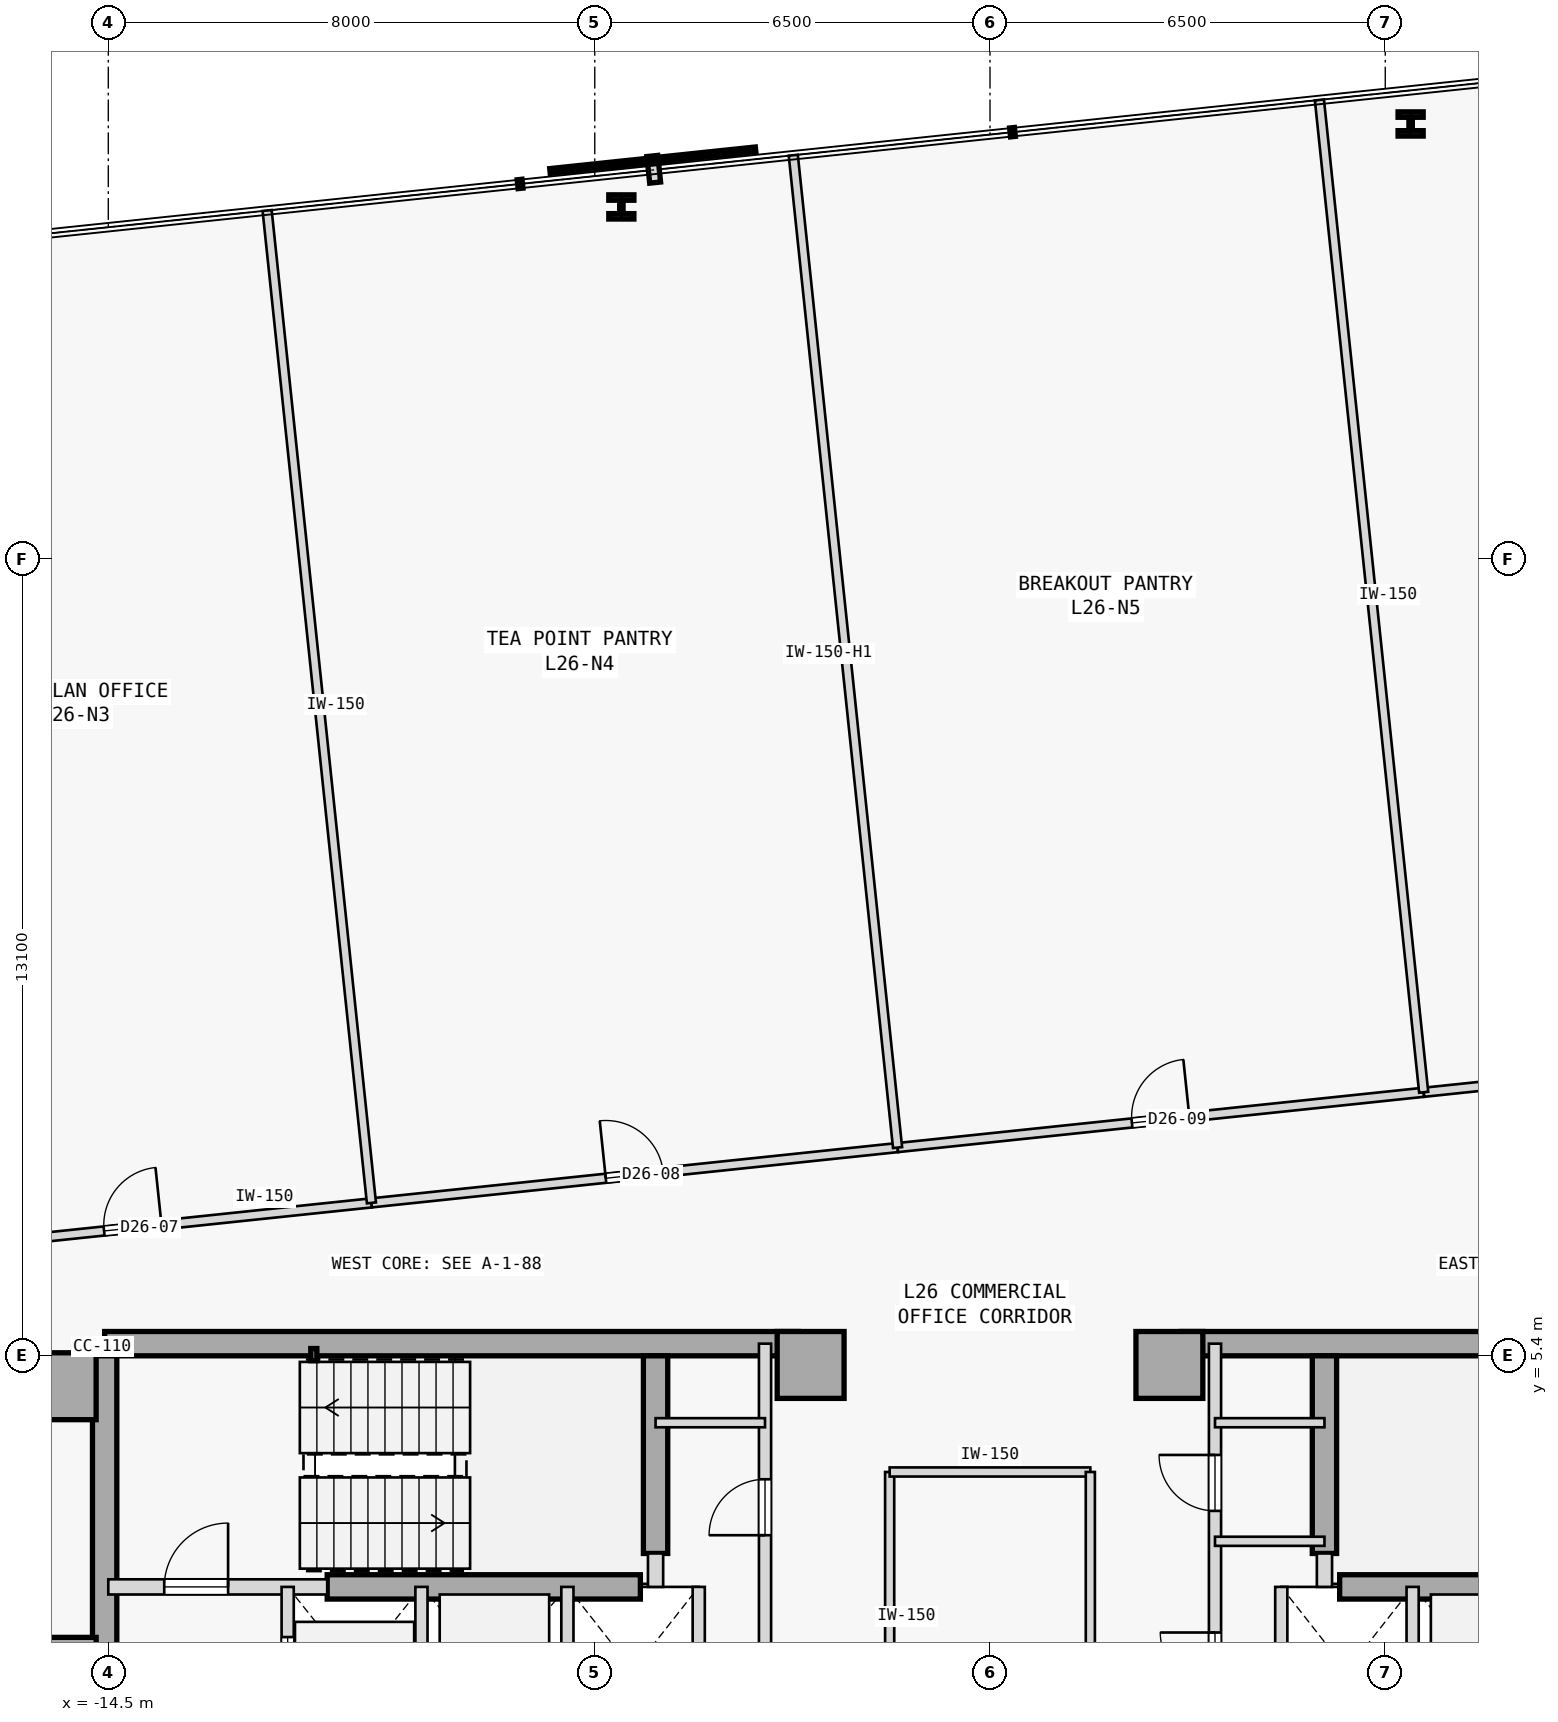
"""IFC4 building model, lengths in metres.
Left out: names, types, materials, properties, quantities, classifications, styles, units other than length and angle.
Written with IfcOpenShell. Run it as: python <this file> out.ifc"""

import sys

from ifc_helpers import new_model, si_unit, direction, frame, frame_2d, origin, origin_2d, place, context, subcontext, project, spatial, rectangle, hollow_rectangle, i_section, extrude, element, fill, save


model = new_model("IFC4")
c1 = context("Model", 3, precision=1e-05, world=origin(), true_north=direction((0.0, 1.0)))
c2 = subcontext(c1, "Body", "Model", "MODEL_VIEW")
j1 = project(units=[si_unit("LENGTHUNIT", "METRE"), si_unit("PLANEANGLEUNIT", "RADIAN")], contexts=[c1])
p1 = place(None, origin())
s1 = spatial("IfcSite", under=j1, at=p1, CompositionType="ELEMENT")
p2 = place(p1, origin())
s2 = spatial("IfcBuilding", under=s1, at=p2, CompositionType="ELEMENT")
p3 = place(p2, frame((0.0, 0.0, 105.9)))
s3 = spatial("IfcBuildingStorey", under=s2, at=p3, CompositionType="ELEMENT", Elevation=105.9)
for number, where, z_axis, x_axis in (
    (1, (-15.25, 4.9, 0.0), (0.0, 0.0, 1.0), (1.0, 0.0, 0.0)),
    (2, (-15.25, 0.22, 0.0), (0.0, 0.0, 1.0), (1.0, 0.0, 0.0)),
    (3, (-2.95, 5.25, 0.0), (0.0, 0.0, 1.0), (1.0, 0.0, 0.0)),
    (4, (2.95, 5.25, 0.0), (0.0, 0.0, 1.0), (1.0, 0.0, 0.0)),
):
    element("IfcColumn", number, at=place(p3, frame(where, z_axis=z_axis, x_axis=x_axis)), inside=s3, PredefinedType="COLUMN", context=c2, shape_type="SweptSolid", body=[
        extrude(rectangle(XDim=1.1, YDim=1.1, at=origin_2d()), origin(), (0.0, 0.0, 1.0), 3.7),
    ])
p4 = place(p3, frame((-14.56, 5.6, 0.0), z_axis=(0.0, 0.0, 1.0), x_axis=(1.0, 0.0, 0.0)))
e5 = element("IfcWall", 5, at=p4, inside=s3, PredefinedType="SHEAR", context=c2, shape_type="SweptSolid", body=[
    extrude(rectangle(XDim=11.41, YDim=0.4, at=frame_2d((5.705, 0.0))), origin(), (0.0, 0.0, 1.0), 3.475),
])
p5 = place(p3, frame((-14.56, -5.4, 0.0), z_axis=(0.0, 0.0, 1.0), x_axis=(0.0, 1.0, 0.0)))
e6 = element("IfcWall", 6, at=p5, inside=s3, PredefinedType="SHEAR", context=c2, shape_type="SweptSolid", body=[
    extrude(rectangle(XDim=10.8, YDim=0.4, at=frame_2d((5.4, 0.0))), origin(), (0.0, 0.0, 1.0), 3.475),
])
p6 = place(p3, frame((-5.5, 2.15, 0.0), z_axis=(0.0, 0.0, 1.0), x_axis=(0.0, 1.0, 0.0)))
e7 = element("IfcWall", 7, at=p6, inside=s3, PredefinedType="SHEAR", context=c2, shape_type="SweptSolid", body=[
    extrude(rectangle(XDim=3.25, YDim=0.4, at=frame_2d((1.625, 0.0))), origin(), (0.0, 0.0, 1.0), 3.475),
])
p7 = place(p3, frame((-10.9, 1.6, 0.0), z_axis=(0.0, 0.0, 1.0), x_axis=(1.0, 0.0, 0.0)))
e8 = element("IfcWall", 8, at=p7, inside=s3, PredefinedType="SHEAR", context=c2, shape_type="SweptSolid", body=[
    extrude(rectangle(XDim=5.15, YDim=0.4, at=frame_2d((2.575, 0.0))), origin(), (0.0, 0.0, 1.0), 3.475),
])
p8 = place(p3, frame((3.15, 5.6, 0.0), z_axis=(0.0, 0.0, 1.0), x_axis=(1.0, 0.0, 0.0)))
e9 = element("IfcWall", 9, at=p8, inside=s3, PredefinedType="SHEAR", context=c2, shape_type="SweptSolid", body=[
    extrude(rectangle(XDim=11.41, YDim=0.4, at=frame_2d((5.705, 0.0))), origin(), (0.0, 0.0, 1.0), 3.475),
])
p9 = place(p3, frame((5.5, 2.15, 0.0), z_axis=(0.0, 0.0, 1.0), x_axis=(0.0, 1.0, 0.0)))
e10 = element("IfcWall", 10, at=p9, inside=s3, PredefinedType="SHEAR", context=c2, shape_type="SweptSolid", body=[
    extrude(rectangle(XDim=3.25, YDim=0.4, at=frame_2d((1.625, 0.0))), origin(), (0.0, 0.0, 1.0), 3.475),
])
p10 = place(p3, frame((5.75, 1.6, 0.0), z_axis=(0.0, 0.0, 1.0), x_axis=(1.0, 0.0, 0.0)))
e11 = element("IfcWall", 11, at=p10, inside=s3, PredefinedType="SHEAR", context=c2, shape_type="SweptSolid", body=[
    extrude(rectangle(XDim=5.15, YDim=0.4, at=frame_2d((2.575, 0.0))), origin(), (0.0, 0.0, 1.0), 3.475),
])
p11 = place(p3, frame((-11.12, 5.42, 0.0), z_axis=(0.0, 0.0, 1.0), x_axis=(1.0, 0.0, 0.0)))
e12 = element("IfcColumn", 12, at=p11, inside=s3, PredefinedType="COLUMN", context=c2, shape_type="SweptSolid", body=[
    extrude(hollow_rectangle(XDim=0.1, YDim=0.2, WallThickness=0.008, at=origin_2d()), origin(), (0.0, 0.0, 1.0), 3.7),
])
for number, where, z_axis, x_axis in (
    (13, (6.917, 25.658, 0.0), (0.0, 0.0, 1.0), (1.0, 0.0, 0.0)),
    (14, (-6.062, 24.293, 0.0), (0.0, 0.0, 1.0), (1.0, 0.0, 0.0)),
):
    element("IfcColumn", number, at=place(p3, frame(where, z_axis=z_axis, x_axis=x_axis)), inside=s3, PredefinedType="COLUMN", context=c2, shape_type="SweptSolid", body=[
        extrude(i_section(OverallWidth=0.413, OverallDepth=0.398, WebThickness=0.056, FlangeThickness=0.089, FilletRadius=0.015, at=origin_2d()), origin(), (0.0, 0.0, 1.0), 3.7),
    ])
p12 = place(p3, frame((-14.5, 1.6, 0.0), z_axis=(0.0, 0.0, 1.0), x_axis=(1.0, 0.0, 0.0)))
e15 = element("IfcWall", 15, at=p12, inside=s3, PredefinedType="STANDARD", context=c2, shape_type="SweptSolid", body=[
    extrude(rectangle(XDim=3.6, YDim=0.25, at=frame_2d((1.8, 0.0))), origin(), (0.0, 0.0, 1.0), 3.475),
])
p13 = place(p12, frame((0.92, 0.0, 0.0)))
e16 = element("IfcOpeningElement", 16, at=p13, cuts=e15, PredefinedType="OPENING", context=c2, shape_type="SweptSolid", body=[
    extrude(rectangle(XDim=1.05, YDim=2.15, at=frame_2d((0.525, 1.075))), frame((0.0, 0.135, 0.0), z_axis=(0.0, -1.0, 0.0), x_axis=(1.0, 0.0, 0.0)), (0.0, 0.0, 1.0), 0.27),
])
p14 = place(p3, frame((-5.5, 1.6, 0.0), z_axis=(0.0, 0.0, 1.0), x_axis=(0.0, 1.0, 0.0)))
e17 = element("IfcWall", 17, at=p14, inside=s3, PredefinedType="STANDARD", context=c2, shape_type="SweptSolid", body=[
    extrude(rectangle(XDim=0.55, YDim=0.25, at=frame_2d((0.275, 0.0))), origin(), (0.0, 0.0, 1.0), 3.475),
])
p15 = place(p3, frame((-3.7, -1.15, 0.0), z_axis=(0.0, 0.0, 1.0), x_axis=(0.0, 1.0, 0.0)))
e18 = element("IfcWall", 18, at=p15, inside=s3, PredefinedType="STANDARD", context=c2, shape_type="SweptSolid", body=[
    extrude(rectangle(XDim=6.75, YDim=0.2, at=frame_2d((3.375, 0.0))), origin(), (0.0, 0.0, 1.0), 3.475),
])
p16 = place(p15, frame((3.6, 0.0, 0.0)))
e19 = element("IfcOpeningElement", 19, at=p16, cuts=e18, PredefinedType="OPENING", context=c2, shape_type="SweptSolid", body=[
    extrude(rectangle(XDim=0.92, YDim=2.15, at=frame_2d((0.46, 1.075))), frame((0.0, 0.11, 0.0), z_axis=(0.0, -1.0, 0.0), x_axis=(1.0, 0.0, 0.0)), (0.0, 0.0, 1.0), 0.22),
])
p17 = place(p3, frame((-11.55, -1.15, 0.0), z_axis=(0.0, 0.0, 1.0), x_axis=(0.0, 1.0, 0.0)))
e20 = element("IfcWall", 20, at=p17, inside=s3, PredefinedType="STANDARD", context=c2, shape_type="SweptSolid", body=[
    extrude(rectangle(XDim=2.75, YDim=0.2, at=frame_2d((1.375, 0.0))), origin(), (0.0, 0.0, 1.0), 3.475),
])
p18 = place(p17, frame((0.825, 0.0, 0.0)))
e21 = element("IfcOpeningElement", 21, at=p18, cuts=e20, PredefinedType="OPENING", context=c2, shape_type="SweptSolid", body=[
    extrude(rectangle(XDim=1.1, YDim=2.15, at=frame_2d((0.55, 1.075))), frame((0.0, 0.11, 0.0), z_axis=(0.0, -1.0, 0.0), x_axis=(1.0, 0.0, 0.0)), (0.0, 0.0, 1.0), 0.22),
])
for number, where, z_axis, x_axis in (
    (22, (-9.35, -1.15, 0.0), (0.0, 0.0, 1.0), (0.0, 1.0, 0.0)),
    (23, (-6.95, -1.15, 0.0), (0.0, 0.0, 1.0), (0.0, 1.0, 0.0)),
    (24, (-4.79, -1.15, 0.0), (0.0, 0.0, 1.0), (0.0, 1.0, 0.0)),
):
    element("IfcWall", number, at=place(p3, frame(where, z_axis=z_axis, x_axis=x_axis)), inside=s3, PredefinedType="STANDARD", context=c2, shape_type="SweptSolid", body=[
        extrude(rectangle(XDim=2.75, YDim=0.2, at=frame_2d((1.375, 0.0))), origin(), (0.0, 0.0, 1.0), 3.475),
    ])
p19 = place(p3, frame((5.5, 1.6, 0.0), z_axis=(0.0, 0.0, 1.0), x_axis=(0.0, 1.0, 0.0)))
e25 = element("IfcWall", 25, at=p19, inside=s3, PredefinedType="STANDARD", context=c2, shape_type="SweptSolid", body=[
    extrude(rectangle(XDim=0.55, YDim=0.25, at=frame_2d((0.275, 0.0))), origin(), (0.0, 0.0, 1.0), 3.475),
])
p20 = place(p3, frame((3.7, -1.15, 0.0), z_axis=(0.0, 0.0, 1.0), x_axis=(0.0, 1.0, 0.0)))
e26 = element("IfcWall", 26, at=p20, inside=s3, PredefinedType="STANDARD", context=c2, shape_type="SweptSolid", body=[
    extrude(rectangle(XDim=6.75, YDim=0.2, at=frame_2d((3.375, 0.0))), origin(), (0.0, 0.0, 1.0), 3.475),
])
p21 = place(p20, frame((1.1, 0.0, 0.0)))
e27 = element("IfcOpeningElement", 27, at=p21, cuts=e26, PredefinedType="OPENING", context=c2, shape_type="SweptSolid", body=[
    extrude(rectangle(XDim=0.9, YDim=2.15, at=frame_2d((0.45, 1.075))), frame((0.0, 0.11, 0.0), z_axis=(0.0, -1.0, 0.0), x_axis=(1.0, 0.0, 0.0)), (0.0, 0.0, 1.0), 0.22),
])
p22 = place(p20, frame((4.0, 0.0, 0.0)))
e28 = element("IfcOpeningElement", 28, at=p22, cuts=e26, PredefinedType="OPENING", context=c2, shape_type="SweptSolid", body=[
    extrude(rectangle(XDim=0.92, YDim=2.15, at=frame_2d((0.46, 1.075))), frame((0.0, 0.11, 0.0), z_axis=(0.0, -1.0, 0.0), x_axis=(1.0, 0.0, 0.0)), (0.0, 0.0, 1.0), 0.22),
])
for number, where, z_axis, x_axis in (
    (29, (6.95, -1.15, 0.0), (0.0, 0.0, 1.0), (0.0, 1.0, 0.0)),
    (30, (4.79, -1.15, 0.0), (0.0, 0.0, 1.0), (0.0, 1.0, 0.0)),
):
    element("IfcWall", number, at=place(p3, frame(where, z_axis=z_axis, x_axis=x_axis)), inside=s3, PredefinedType="STANDARD", context=c2, shape_type="SweptSolid", body=[
        extrude(rectangle(XDim=2.75, YDim=0.2, at=frame_2d((1.375, 0.0))), origin(), (0.0, 0.0, 1.0), 3.475),
    ])
for number, where, z_axis, x_axis in (
    (31, (-5.5, 4.3, 0.0), (0.0, 0.0, 1.0), (1.0, 0.0, 0.0)),
    (32, (3.7, 4.3, 0.0), (0.0, 0.0, 1.0), (1.0, 0.0, 0.0)),
    (33, (3.7, 2.35, 0.0), (0.0, 0.0, 1.0), (1.0, 0.0, 0.0)),
):
    element("IfcWall", number, at=place(p3, frame(where, z_axis=z_axis, x_axis=x_axis)), inside=s3, PredefinedType="PARTITIONING", context=c2, shape_type="SweptSolid", body=[
        extrude(rectangle(XDim=1.8, YDim=0.15, at=frame_2d((0.9, 0.0))), origin(), (0.0, 0.0, 1.0), 3.475),
    ])
p23 = place(p3, frame((-1.65, -3.49, 0.0), z_axis=(0.0, 0.0, 1.0), x_axis=(-0.000104928124, 0.999999994495, 0.0)))
e34 = element("IfcWall", 34, at=p23, inside=s3, PredefinedType="PARTITIONING", context=c2, shape_type="SweptSolid", body=[
    extrude(rectangle(XDim=6.98, YDim=0.15, at=frame_2d((3.49, 0.0))), origin(), (0.0, 0.0, 1.0), 3.475),
])
p24 = place(p23, frame((3.015, 0.0, 0.0)))
e35 = element("IfcOpeningElement", 35, at=p24, cuts=e34, PredefinedType="OPENING", context=c2, shape_type="SweptSolid", body=[
    extrude(rectangle(XDim=0.95, YDim=2.15, at=frame_2d((0.475, 1.075))), frame((0.0, 0.085, 0.0), z_axis=(0.0, -1.0, 0.0), x_axis=(1.0, 0.0, 0.0)), (0.0, 0.0, 1.0), 0.17),
])
p25 = place(p3, frame((-1.65, 3.49, 0.0), z_axis=(0.0, 0.0, 1.0), x_axis=(1.0, 0.0, 0.0)))
e36 = element("IfcWall", 36, at=p25, inside=s3, PredefinedType="PARTITIONING", context=c2, shape_type="SweptSolid", body=[
    extrude(rectangle(XDim=3.3, YDim=0.15, at=frame_2d((1.65, 0.0))), origin(), (0.0, 0.0, 1.0), 3.475),
])
p26 = place(p3, frame((1.65, -3.49, 0.0), z_axis=(0.0, 0.0, 1.0), x_axis=(-6.9952083e-05, 0.999999997553, 0.0)))
e37 = element("IfcWall", 37, at=p26, inside=s3, PredefinedType="PARTITIONING", context=c2, shape_type="SweptSolid", body=[
    extrude(rectangle(XDim=6.98, YDim=0.15, at=frame_2d((3.49, 0.0))), origin(), (0.0, 0.0, 1.0), 3.475),
])
p27 = place(p3, frame((-18.021, 7.09, 0.0), z_axis=(0.0, 0.0, 1.0), x_axis=(0.994521544681, 0.104531799785, 0.0)))
e38 = element("IfcWall", 38, at=p27, inside=s3, PredefinedType="PARTITIONING", context=c2, shape_type="SweptSolid", body=[
    extrude(rectangle(XDim=7.892, YDim=0.15, at=frame_2d((3.946, 0.0))), origin(), (0.0, 0.0, 1.0), 3.475),
])
p28 = place(p27, frame((3.471, 0.0, 0.0)))
e39 = element("IfcOpeningElement", 39, at=p28, cuts=e38, PredefinedType="OPENING", context=c2, shape_type="SweptSolid", body=[
    extrude(rectangle(XDim=0.95, YDim=2.15, at=frame_2d((0.475, 1.075))), frame((0.0, 0.085, 0.0), z_axis=(0.0, -1.0, 0.0), x_axis=(1.0, 0.0, 0.0)), (0.0, 0.0, 1.0), 0.17),
])
p29 = place(p3, frame((-10.173, 7.915, 0.0), z_axis=(0.0, 0.0, 1.0), x_axis=(0.994521586424, 0.104531402636, 0.0)))
e40 = element("IfcWall", 40, at=p29, inside=s3, PredefinedType="PARTITIONING", context=c2, shape_type="SweptSolid", body=[
    extrude(rectangle(XDim=8.7, YDim=0.15, at=frame_2d((4.35, 0.0))), origin(), (0.0, 0.0, 1.0), 3.475),
])
p30 = place(p29, frame((3.875, 0.0, 0.0)))
e41 = element("IfcOpeningElement", 41, at=p30, cuts=e40, PredefinedType="OPENING", context=c2, shape_type="SweptSolid", body=[
    extrude(rectangle(XDim=0.95, YDim=2.15, at=frame_2d((0.475, 1.075))), frame((0.0, 0.085, 0.0), z_axis=(0.0, -1.0, 0.0), x_axis=(1.0, 0.0, 0.0)), (0.0, 0.0, 1.0), 0.17),
])
p31 = place(p3, frame((-1.52, 8.825, 0.0), z_axis=(0.0, 0.0, 1.0), x_axis=(0.994524503348, 0.104503647022, 0.0)))
e42 = element("IfcWall", 42, at=p31, inside=s3, PredefinedType="PARTITIONING", context=c2, shape_type="SweptSolid", body=[
    extrude(rectangle(XDim=8.7, YDim=0.15, at=frame_2d((4.35, 0.0))), origin(), (0.0, 0.0, 1.0), 3.475),
])
p32 = place(p31, frame((3.875, 0.0, 0.0)))
e43 = element("IfcOpeningElement", 43, at=p32, cuts=e42, PredefinedType="OPENING", context=c2, shape_type="SweptSolid", body=[
    extrude(rectangle(XDim=0.95, YDim=2.15, at=frame_2d((0.475, 1.075))), frame((0.0, 0.085, 0.0), z_axis=(0.0, -1.0, 0.0), x_axis=(1.0, 0.0, 0.0)), (0.0, 0.0, 1.0), 0.17),
])
p33 = place(p3, frame((7.132, 9.734, 0.0), z_axis=(0.0, 0.0, 1.0), x_axis=(0.994521586424, 0.104531402636, 0.0)))
e44 = element("IfcWall", 44, at=p33, inside=s3, PredefinedType="PARTITIONING", context=c2, shape_type="SweptSolid", body=[
    extrude(rectangle(XDim=8.7, YDim=0.15, at=frame_2d((4.35, 0.0))), origin(), (0.0, 0.0, 1.0), 3.475),
])
p34 = place(p33, frame((3.875, 0.0, 0.0)))
e45 = element("IfcOpeningElement", 45, at=p34, cuts=e44, PredefinedType="OPENING", context=c2, shape_type="SweptSolid", body=[
    extrude(rectangle(XDim=0.95, YDim=2.15, at=frame_2d((0.475, 1.075))), frame((0.0, 0.085, 0.0), z_axis=(0.0, -1.0, 0.0), x_axis=(1.0, 0.0, 0.0)), (0.0, 0.0, 1.0), 0.17),
])
p35 = place(p3, frame((-10.173, 7.915, 0.0), z_axis=(0.0, 0.0, 1.0), x_axis=(-0.104521364336, 0.99452264147, 0.0)))
e46 = element("IfcWall", 46, at=p35, inside=s3, PredefinedType="PARTITIONING", context=c2, shape_type="SweptSolid", body=[
    extrude(rectangle(XDim=16.409, YDim=0.15, at=frame_2d((8.205, 0.0))), origin(), (0.0, 0.0, 1.0), 3.475),
])
p36 = place(p3, frame((-1.52, 8.825, 0.0), z_axis=(0.0, 0.0, 1.0), x_axis=(-0.104521364336, 0.99452264147, 0.0)))
e47 = element("IfcWall", 47, at=p36, inside=s3, PredefinedType="PARTITIONING", context=c2, shape_type="SweptSolid", body=[
    extrude(rectangle(XDim=16.409, YDim=0.15, at=frame_2d((8.205, 0.0))), origin(), (0.0, 0.0, 1.0), 3.025),
])
p37 = place(p3, frame((7.132, 9.734, 0.0), z_axis=(0.0, 0.0, 1.0), x_axis=(-0.104521364336, 0.99452264147, 0.0)))
e48 = element("IfcWall", 48, at=p37, inside=s3, PredefinedType="PARTITIONING", context=c2, shape_type="SweptSolid", body=[
    extrude(rectangle(XDim=16.409, YDim=0.15, at=frame_2d((8.205, 0.0))), origin(), (0.0, 0.0, 1.0), 3.475),
])
p38 = place(p13, origin())
e49 = element("IfcDoor", 49, at=p38, inside=s3, OperationType="SINGLE_SWING_RIGHT", PredefinedType="DOOR", context=c2, shape_type="SweptSolid", body=[
    extrude(rectangle(XDim=1.05, YDim=2.15, at=frame_2d((0.525, 1.075))), frame((0.0, 0.025, 0.0), z_axis=(0.0, -1.0, 0.0), x_axis=(1.0, 0.0, 0.0)), (0.0, 0.0, 1.0), 0.05),
])
fill(e16, e49)
p39 = place(p18, origin())
e50 = element("IfcDoor", 50, at=p39, inside=s3, OperationType="SLIDING_TO_RIGHT", PredefinedType="DOOR", context=c2, shape_type="SweptSolid", body=[
    extrude(rectangle(XDim=1.1, YDim=2.15, at=frame_2d((0.55, 1.075))), frame((0.0, 0.025, 0.0), z_axis=(0.0, -1.0, 0.0), x_axis=(1.0, 0.0, 0.0)), (0.0, 0.0, 1.0), 0.05),
])
fill(e21, e50)
p40 = place(p16, origin())
e51 = element("IfcDoor", 51, at=p40, inside=s3, OperationType="SINGLE_SWING_LEFT", PredefinedType="DOOR", context=c2, shape_type="SweptSolid", body=[
    extrude(rectangle(XDim=0.92, YDim=2.15, at=frame_2d((0.46, 1.075))), frame((0.0, 0.025, 0.0), z_axis=(0.0, -1.0, 0.0), x_axis=(1.0, 0.0, 0.0)), (0.0, 0.0, 1.0), 0.05),
])
fill(e19, e51)
p41 = place(p21, origin())
e52 = element("IfcDoor", 52, at=p41, inside=s3, OperationType="SINGLE_SWING_RIGHT", PredefinedType="DOOR", context=c2, shape_type="SweptSolid", body=[
    extrude(rectangle(XDim=0.9, YDim=2.15, at=frame_2d((0.45, 1.075))), frame((0.0, 0.025, 0.0), z_axis=(0.0, -1.0, 0.0), x_axis=(1.0, 0.0, 0.0)), (0.0, 0.0, 1.0), 0.05),
])
fill(e27, e52)
p42 = place(p22, origin())
e53 = element("IfcDoor", 53, at=p42, inside=s3, OperationType="SINGLE_SWING_RIGHT", PredefinedType="DOOR", context=c2, shape_type="SweptSolid", body=[
    extrude(rectangle(XDim=0.92, YDim=2.15, at=frame_2d((0.46, 1.075))), frame((0.0, 0.025, 0.0), z_axis=(0.0, -1.0, 0.0), x_axis=(1.0, 0.0, 0.0)), (0.0, 0.0, 1.0), 0.05),
])
fill(e28, e53)
p43 = place(p28, origin())
e54 = element("IfcDoor", 54, at=p43, inside=s3, OperationType="SINGLE_SWING_RIGHT", PredefinedType="DOOR", context=c2, shape_type="SweptSolid", body=[
    extrude(rectangle(XDim=0.95, YDim=2.15, at=frame_2d((0.475, 1.075))), frame((0.0, 0.025, 0.0), z_axis=(0.0, -1.0, 0.0), x_axis=(1.0, 0.0, 0.0)), (0.0, 0.0, 1.0), 0.05),
])
fill(e39, e54)
p44 = place(p30, origin())
e55 = element("IfcDoor", 55, at=p44, inside=s3, OperationType="SINGLE_SWING_LEFT", PredefinedType="DOOR", context=c2, shape_type="SweptSolid", body=[
    extrude(rectangle(XDim=0.95, YDim=2.15, at=frame_2d((0.475, 1.075))), frame((0.0, 0.025, 0.0), z_axis=(0.0, -1.0, 0.0), x_axis=(1.0, 0.0, 0.0)), (0.0, 0.0, 1.0), 0.05),
])
fill(e41, e55)
p45 = place(p32, origin())
e56 = element("IfcDoor", 56, at=p45, inside=s3, OperationType="SINGLE_SWING_RIGHT", PredefinedType="DOOR", context=c2, shape_type="SweptSolid", body=[
    extrude(rectangle(XDim=0.95, YDim=2.15, at=frame_2d((0.475, 1.075))), frame((0.0, 0.025, 0.0), z_axis=(0.0, -1.0, 0.0), x_axis=(1.0, 0.0, 0.0)), (0.0, 0.0, 1.0), 0.05),
])
fill(e43, e56)
save(model, sys.argv[1])
